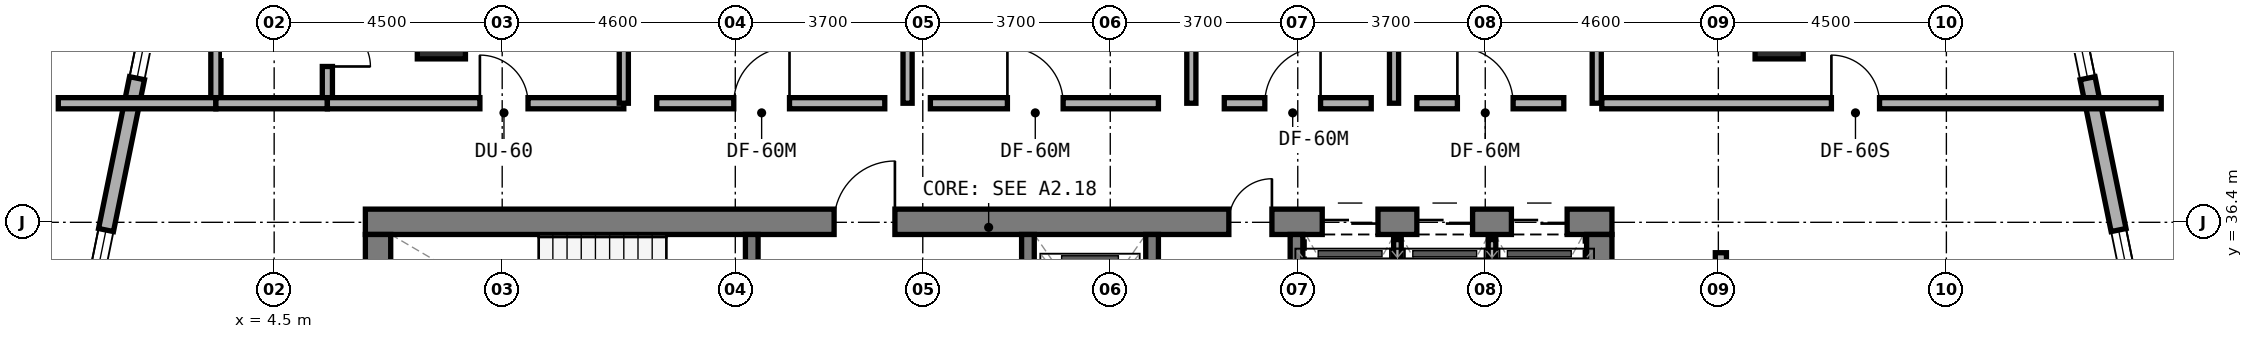
"""IFC4 building model, lengths in metres.
Left out: names, types, materials, properties, quantities, classifications, styles, units other than length and angle.
Written with IfcOpenShell. Run it as: python <this file> out.ifc"""

import sys

from ifc_helpers import new_model, si_unit, direction, frame, frame_2d, origin, origin_2d, place, context, subcontext, project, spatial, rectangle, extrude, element, fill, save


model = new_model("IFC4")
c1 = context("Model", 3, precision=1e-05, world=origin(), true_north=direction((0.0, 1.0)))
c2 = subcontext(c1, "Body", "Model", "MODEL_VIEW")
j1 = project(units=[si_unit("LENGTHUNIT", "METRE"), si_unit("PLANEANGLEUNIT", "RADIAN")], contexts=[c1])
p1 = place(None, origin())
s1 = spatial("IfcSite", under=j1, at=p1, CompositionType="ELEMENT")
p2 = place(p1, origin())
s2 = spatial("IfcBuilding", under=s1, at=p2, CompositionType="ELEMENT")
p3 = place(p2, frame((0.0, 0.0, 73.0)))
s3 = spatial("IfcBuildingStorey", under=s2, at=p3, CompositionType="ELEMENT", Elevation=73.0)
p4 = place(p3, frame((6.3, 36.41, 0.0), z_axis=(0.0, 0.0, 1.0), x_axis=(1.0, 0.0, 0.0)))
e1 = element("IfcWall", 1, at=p4, inside=s3, PredefinedType="SHEAR", context=c2, shape_type="SweptSolid", body=[
    extrude(rectangle(XDim=24.6, YDim=0.5, at=frame_2d((12.3, 0.0))), origin(), (0.0, 0.0, 1.0), 3.5),
])
p5 = place(p4, frame((9.25, 0.0, 0.0)))
e2 = element("IfcOpeningElement", 2, at=p5, cuts=e1, PredefinedType="OPENING", context=c2, shape_type="SweptSolid", body=[
    extrude(rectangle(XDim=1.2, YDim=2.15, at=frame_2d((0.6, 1.075))), frame((0.0, 0.26, 0.0), z_axis=(0.0, -1.0, 0.0), x_axis=(1.0, 0.0, 0.0)), (0.0, 0.0, 1.0), 0.52),
])
p6 = place(p4, frame((17.04, 0.0, 0.0)))
e3 = element("IfcOpeningElement", 3, at=p6, cuts=e1, PredefinedType="OPENING", context=c2, shape_type="SweptSolid", body=[
    extrude(rectangle(XDim=0.85, YDim=2.1, at=frame_2d((0.425, 1.05))), frame((0.0, 0.26, 0.0), z_axis=(0.0, -1.0, 0.0), x_axis=(1.0, 0.0, 0.0)), (0.0, 0.0, 1.0), 0.52),
])
p7 = place(p4, frame((18.883, 0.0, 0.0)))
e4 = element("IfcOpeningElement", 4, at=p7, cuts=e1, PredefinedType="OPENING", context=c2, shape_type="SweptSolid", body=[
    extrude(rectangle(XDim=1.1, YDim=2.15, at=frame_2d((0.55, 1.075))), frame((0.0, 0.26, 0.0), z_axis=(0.0, -1.0, 0.0), x_axis=(1.0, 0.0, 0.0)), (0.0, 0.0, 1.0), 0.52),
])
p8 = place(p4, frame((20.75, 0.0, 0.0)))
e5 = element("IfcOpeningElement", 5, at=p8, cuts=e1, PredefinedType="OPENING", context=c2, shape_type="SweptSolid", body=[
    extrude(rectangle(XDim=1.1, YDim=2.15, at=frame_2d((0.55, 1.075))), frame((0.0, 0.26, 0.0), z_axis=(0.0, -1.0, 0.0), x_axis=(1.0, 0.0, 0.0)), (0.0, 0.0, 1.0), 0.52),
])
p9 = place(p4, frame((22.616, 0.0, 0.0)))
e6 = element("IfcOpeningElement", 6, at=p9, cuts=e1, PredefinedType="OPENING", context=c2, shape_type="SweptSolid", body=[
    extrude(rectangle(XDim=1.1, YDim=2.15, at=frame_2d((0.55, 1.075))), frame((0.0, 0.26, 0.0), z_axis=(0.0, -1.0, 0.0), x_axis=(1.0, 0.0, 0.0)), (0.0, 0.0, 1.0), 0.52),
])
for number, where, z_axis, x_axis in (
    (7, (6.55, 33.0, 0.0), (0.0, 0.0, 1.0), (0.0, 1.0, 0.0)),
    (8, (30.65, 33.0, 0.0), (0.0, 0.0, 1.0), (0.0, 1.0, 0.0)),
):
    element("IfcWall", number, at=place(p3, frame(where, z_axis=z_axis, x_axis=x_axis)), inside=s3, PredefinedType="SHEAR", context=c2, shape_type="SweptSolid", body=[
        extrude(rectangle(XDim=3.16, YDim=0.5, at=frame_2d((1.58, 0.0))), origin(), (0.0, 0.0, 1.0), 3.5),
    ])
p10 = place(p3, frame((13.925, 33.0, 0.0), z_axis=(0.0, 0.0, 1.0), x_axis=(0.0, 1.0, 0.0)))
e9 = element("IfcWall", 9, at=p10, inside=s3, PredefinedType="STANDARD", context=c2, shape_type="SweptSolid", body=[
    extrude(rectangle(XDim=3.16, YDim=0.25, at=frame_2d((1.58, 0.0))), origin(), (0.0, 0.0, 1.0), 3.22),
])
p11 = place(p10, frame((0.98, 0.0, 0.0)))
e10 = element("IfcOpeningElement", 10, at=p11, cuts=e9, PredefinedType="OPENING", context=c2, shape_type="SweptSolid", body=[
    extrude(rectangle(XDim=1.1, YDim=2.15, at=frame_2d((0.55, 1.075))), frame((0.0, 0.135, 0.0), z_axis=(0.0, -1.0, 0.0), x_axis=(1.0, 0.0, 0.0)), (0.0, 0.0, 1.0), 0.27),
])
p12 = place(p3, frame((19.375, 33.0, 0.0), z_axis=(0.0, 0.0, 1.0), x_axis=(0.0, 1.0, 0.0)))
e11 = element("IfcWall", 11, at=p12, inside=s3, PredefinedType="STANDARD", context=c2, shape_type="SweptSolid", body=[
    extrude(rectangle(XDim=3.16, YDim=0.25, at=frame_2d((1.58, 0.0))), origin(), (0.0, 0.0, 1.0), 3.22),
])
p13 = place(p12, frame((0.98, 0.0, 0.0)))
e12 = element("IfcOpeningElement", 12, at=p13, cuts=e11, PredefinedType="OPENING", context=c2, shape_type="SweptSolid", body=[
    extrude(rectangle(XDim=1.1, YDim=2.15, at=frame_2d((0.55, 1.075))), frame((0.0, 0.135, 0.0), z_axis=(0.0, -1.0, 0.0), x_axis=(1.0, 0.0, 0.0)), (0.0, 0.0, 1.0), 0.27),
])
for number, where, z_axis, x_axis in (
    (13, (21.825, 33.0, 0.0), (0.0, 0.0, 1.0), (0.0, 1.0, 0.0)),
    (14, (24.675, 33.0, 0.0), (0.0, 0.0, 1.0), (0.0, 1.0, 0.0)),
):
    element("IfcWall", number, at=place(p3, frame(where, z_axis=z_axis, x_axis=x_axis)), inside=s3, PredefinedType="STANDARD", context=c2, shape_type="SweptSolid", body=[
        extrude(rectangle(XDim=3.16, YDim=0.25, at=frame_2d((1.58, 0.0))), origin(), (0.0, 0.0, 1.0), 3.22),
    ])
for number, where, z_axis, x_axis in (
    (15, (34.2, 40.2, 0.0), (0.0, 0.0, 1.0), (1.0, 0.0, 0.0)),
    (16, (7.8, 40.2, 0.0), (0.0, 0.0, 1.0), (1.0, 0.0, 0.0)),
):
    element("IfcColumn", number, at=place(p3, frame(where, z_axis=z_axis, x_axis=x_axis)), inside=s3, PredefinedType="COLUMN", context=c2, shape_type="SweptSolid", body=[
        extrude(rectangle(XDim=0.95, YDim=1.15, at=origin_2d()), origin(), (0.0, 0.0, 1.0), 3.5),
    ])
p14 = place(p3, frame((41.864, 31.516, 0.0), z_axis=(0.0, 0.0, 1.0), x_axis=(-0.199990901713, 0.979797754249, 0.0)))
e17 = element("IfcWall", 17, at=p14, inside=s3, PredefinedType="STANDARD", context=c2, shape_type="SweptSolid", body=[
    extrude(rectangle(XDim=10.065, YDim=0.3, at=frame_2d((5.033, 0.0))), origin(), (0.0, 0.0, 1.0), 3.22),
])
p15 = place(p14, frame((2.429, 0.0, 0.8)))
e18 = element("IfcOpeningElement", 18, at=p15, cuts=e17, PredefinedType="OPENING", context=c2, shape_type="SweptSolid", body=[
    extrude(rectangle(XDim=2.4, YDim=1.6, at=frame_2d((1.2, 0.8))), frame((0.0, 0.16, 0.0), z_axis=(0.0, -1.0, 0.0), x_axis=(1.0, 0.0, 0.0)), (0.0, 0.0, 1.0), 0.32),
])
p16 = place(p14, frame((7.887, 0.0, 0.85)))
e19 = element("IfcOpeningElement", 19, at=p16, cuts=e17, PredefinedType="OPENING", context=c2, shape_type="SweptSolid", body=[
    extrude(rectangle(XDim=1.8, YDim=1.5, at=frame_2d((0.9, 0.75))), frame((0.0, 0.16, 0.0), z_axis=(0.0, -1.0, 0.0), x_axis=(1.0, 0.0, 0.0)), (0.0, 0.0, 1.0), 0.32),
])
p17 = place(p3, frame((2.229, 41.378, 0.0), z_axis=(0.0, 0.0, 1.0), x_axis=(-0.199990901713, -0.979797754249, 0.0)))
e20 = element("IfcWall", 20, at=p17, inside=s3, PredefinedType="STANDARD", context=c2, shape_type="SweptSolid", body=[
    extrude(rectangle(XDim=10.065, YDim=0.3, at=frame_2d((5.033, 0.0))), origin(), (0.0, 0.0, 1.0), 3.22),
])
p18 = place(p17, frame((0.378, 0.0, 0.85)))
e21 = element("IfcOpeningElement", 21, at=p18, cuts=e20, PredefinedType="OPENING", context=c2, shape_type="SweptSolid", body=[
    extrude(rectangle(XDim=1.8, YDim=1.5, at=frame_2d((0.9, 0.75))), frame((0.0, 0.16, 0.0), z_axis=(0.0, -1.0, 0.0), x_axis=(1.0, 0.0, 0.0)), (0.0, 0.0, 1.0), 0.32),
])
p19 = place(p17, frame((5.236, 0.0, 0.8)))
e22 = element("IfcOpeningElement", 22, at=p19, cuts=e20, PredefinedType="OPENING", context=c2, shape_type="SweptSolid", body=[
    extrude(rectangle(XDim=2.4, YDim=1.6, at=frame_2d((1.2, 0.8))), frame((0.0, 0.16, 0.0), z_axis=(0.0, -1.0, 0.0), x_axis=(1.0, 0.0, 0.0)), (0.0, 0.0, 1.0), 0.32),
])
p20 = place(p3, frame((26.667, 33.1, 0.0), z_axis=(0.0, 0.0, 1.0), x_axis=(0.0, 1.0, 0.0)))
e23 = element("IfcWall", 23, at=p20, inside=s3, PredefinedType="PARTITIONING", context=c2, shape_type="SweptSolid", body=[
    extrude(rectangle(XDim=2.96, YDim=0.15, at=frame_2d((1.48, 0.0))), origin(), (0.0, 0.0, 1.0), 3.22),
])
p21 = place(p3, frame((28.533, 33.1, 0.0), z_axis=(0.0, 0.0, 1.0), x_axis=(0.0, 1.0, 0.0)))
e24 = element("IfcWall", 24, at=p21, inside=s3, PredefinedType="PARTITIONING", context=c2, shape_type="SweptSolid", body=[
    extrude(rectangle(XDim=2.96, YDim=0.15, at=frame_2d((1.48, 0.0))), origin(), (0.0, 0.0, 1.0), 2.495),
])
p22 = place(p3, frame((5.55, 38.85, 0.0), z_axis=(0.0, 0.0, 1.0), x_axis=(0.0, 1.0, 0.0)))
e25 = element("IfcWall", 25, at=p22, inside=s3, PredefinedType="PLUMBINGWALL", context=c2, shape_type="SweptSolid", body=[
    extrude(rectangle(XDim=2.1, YDim=0.2, at=frame_2d((1.05, 0.0))), origin(), (0.0, 0.0, 1.0), 3.22),
])
p23 = place(p22, frame((0.625, 0.0, 0.0)))
e26 = element("IfcOpeningElement", 26, at=p23, cuts=e25, PredefinedType="OPENING", context=c2, shape_type="SweptSolid", body=[
    extrude(rectangle(XDim=0.85, YDim=2.1, at=frame_2d((0.425, 1.05))), frame((0.0, 0.11, 0.0), z_axis=(0.0, -1.0, 0.0), x_axis=(1.0, 0.0, 0.0)), (0.0, 0.0, 1.0), 0.22),
])
p24 = place(p3, frame((3.35, 38.85, 0.0), z_axis=(0.0, 0.0, 1.0), x_axis=(0.0, 1.0, 0.0)))
e27 = element("IfcWall", 27, at=p24, inside=s3, PredefinedType="PLUMBINGWALL", context=c2, shape_type="SweptSolid", body=[
    extrude(rectangle(XDim=2.1, YDim=0.2, at=frame_2d((1.05, 0.0))), origin(), (0.0, 0.0, 1.0), 3.22),
])
p25 = place(p3, frame((0.24, 38.75, 0.0), z_axis=(0.0, 0.0, 1.0), x_axis=(1.0, 0.0, 0.0)))
e28 = element("IfcWall", 28, at=p25, inside=s3, PredefinedType="SOLIDWALL", context=c2, shape_type="SweptSolid", body=[
    extrude(rectangle(XDim=3.11, YDim=0.22, at=frame_2d((1.555, 0.0))), origin(), (0.0, 0.0, 1.0), 3.22),
])
p26 = place(p3, frame((3.35, 38.75, 0.0), z_axis=(0.0, 0.0, 1.0), x_axis=(1.0, 0.0, 0.0)))
e29 = element("IfcWall", 29, at=p26, inside=s3, PredefinedType="SOLIDWALL", context=c2, shape_type="SweptSolid", body=[
    extrude(rectangle(XDim=2.2, YDim=0.22, at=frame_2d((1.1, 0.0))), origin(), (0.0, 0.0, 1.0), 3.22),
])
p27 = place(p3, frame((5.55, 38.75, 0.0), z_axis=(0.0, 0.0, 1.0), x_axis=(1.0, 0.0, 0.0)))
e30 = element("IfcWall", 30, at=p27, inside=s3, PredefinedType="SOLIDWALL", context=c2, shape_type="SweptSolid", body=[
    extrude(rectangle(XDim=5.85, YDim=0.22, at=frame_2d((2.925, 0.0))), origin(), (0.0, 0.0, 1.0), 2.495),
])
p28 = place(p27, frame((3.01, 0.0, 0.0)))
e31 = element("IfcOpeningElement", 31, at=p28, cuts=e30, PredefinedType="OPENING", context=c2, shape_type="SweptSolid", body=[
    extrude(rectangle(XDim=0.95, YDim=2.1, at=frame_2d((0.475, 1.05))), frame((0.0, 0.12, 0.0), z_axis=(0.0, -1.0, 0.0), x_axis=(1.0, 0.0, 0.0)), (0.0, 0.0, 1.0), 0.24),
])
p29 = place(p3, frame((11.4, 38.75, 0.0), z_axis=(0.0, 0.0, 1.0), x_axis=(0.0, 1.0, 0.0)))
e32 = element("IfcWall", 32, at=p29, inside=s3, PredefinedType="SOLIDWALL", context=c2, shape_type="SweptSolid", body=[
    extrude(rectangle(XDim=7.45, YDim=0.18, at=frame_2d((3.725, 0.0))), origin(), (0.0, 0.0, 1.0), 2.745),
])
p30 = place(p3, frame((17.0, 38.75, 0.0), z_axis=(0.0, 0.0, 1.0), x_axis=(0.0, 1.0, 0.0)))
e33 = element("IfcWall", 33, at=p30, inside=s3, PredefinedType="SOLIDWALL", context=c2, shape_type="SweptSolid", body=[
    extrude(rectangle(XDim=8.19, YDim=0.18, at=frame_2d((4.095, 0.0))), origin(), (0.0, 0.0, 1.0), 2.745),
])
p31 = place(p3, frame((12.05, 38.75, 0.0), z_axis=(0.0, 0.0, 1.0), x_axis=(1.0, 0.0, 0.0)))
e34 = element("IfcWall", 34, at=p31, inside=s3, PredefinedType="SOLIDWALL", context=c2, shape_type="SweptSolid", body=[
    extrude(rectangle(XDim=4.5, YDim=0.22, at=frame_2d((2.25, 0.0))), origin(), (0.0, 0.0, 1.0), 2.495),
])
p32 = place(p31, frame((1.52, 0.0, 0.0)))
e35 = element("IfcOpeningElement", 35, at=p32, cuts=e34, PredefinedType="OPENING", context=c2, shape_type="SweptSolid", body=[
    extrude(rectangle(XDim=1.1, YDim=2.1, at=frame_2d((0.55, 1.05))), frame((0.0, 0.12, 0.0), z_axis=(0.0, -1.0, 0.0), x_axis=(1.0, 0.0, 0.0)), (0.0, 0.0, 1.0), 0.24),
])
p33 = place(p3, frame((17.45, 38.75, 0.0), z_axis=(0.0, 0.0, 1.0), x_axis=(1.0, 0.0, 0.0)))
e36 = element("IfcWall", 36, at=p33, inside=s3, PredefinedType="SOLIDWALL", context=c2, shape_type="SweptSolid", body=[
    extrude(rectangle(XDim=4.5, YDim=0.22, at=frame_2d((2.25, 0.0))), origin(), (0.0, 0.0, 1.0), 2.955),
])
p34 = place(p33, frame((1.52, 0.0, 0.0)))
e37 = element("IfcOpeningElement", 37, at=p34, cuts=e36, PredefinedType="OPENING", context=c2, shape_type="SweptSolid", body=[
    extrude(rectangle(XDim=1.1, YDim=2.1, at=frame_2d((0.55, 1.05))), frame((0.0, 0.12, 0.0), z_axis=(0.0, -1.0, 0.0), x_axis=(1.0, 0.0, 0.0)), (0.0, 0.0, 1.0), 0.24),
])
p35 = place(p3, frame((22.6, 38.75, 0.0), z_axis=(0.0, 0.0, 1.0), x_axis=(0.0, 1.0, 0.0)))
e38 = element("IfcWall", 38, at=p35, inside=s3, PredefinedType="SOLIDWALL", context=c2, shape_type="SweptSolid", body=[
    extrude(rectangle(XDim=8.19, YDim=0.18, at=frame_2d((4.095, 0.0))), origin(), (0.0, 0.0, 1.0), 2.745),
])
p36 = place(p3, frame((26.6, 38.75, 0.0), z_axis=(0.0, 0.0, 1.0), x_axis=(0.0, 1.0, 0.0)))
e39 = element("IfcWall", 39, at=p36, inside=s3, PredefinedType="SOLIDWALL", context=c2, shape_type="SweptSolid", body=[
    extrude(rectangle(XDim=8.19, YDim=0.18, at=frame_2d((4.095, 0.0))), origin(), (0.0, 0.0, 1.0), 2.495),
])
p37 = place(p3, frame((23.25, 38.75, 0.0), z_axis=(0.0, 0.0, 1.0), x_axis=(1.0, 0.0, 0.0)))
e40 = element("IfcWall", 40, at=p37, inside=s3, PredefinedType="SOLIDWALL", context=c2, shape_type="SweptSolid", body=[
    extrude(rectangle(XDim=2.9, YDim=0.22, at=frame_2d((1.45, 0.0))), origin(), (0.0, 0.0, 1.0), 2.495),
])
p38 = place(p37, frame((0.8, 0.0, 0.0)))
e41 = element("IfcOpeningElement", 41, at=p38, cuts=e40, PredefinedType="OPENING", context=c2, shape_type="SweptSolid", body=[
    extrude(rectangle(XDim=1.1, YDim=2.1, at=frame_2d((0.55, 1.05))), frame((0.0, 0.12, 0.0), z_axis=(0.0, -1.0, 0.0), x_axis=(1.0, 0.0, 0.0)), (0.0, 0.0, 1.0), 0.24),
])
p39 = place(p3, frame((27.05, 38.75, 0.0), z_axis=(0.0, 0.0, 1.0), x_axis=(1.0, 0.0, 0.0)))
e42 = element("IfcWall", 42, at=p39, inside=s3, PredefinedType="SOLIDWALL", context=c2, shape_type="SweptSolid", body=[
    extrude(rectangle(XDim=2.9, YDim=0.22, at=frame_2d((1.45, 0.0))), origin(), (0.0, 0.0, 1.0), 2.955),
])
p40 = place(p39, frame((0.8, 0.0, 0.0)))
e43 = element("IfcOpeningElement", 43, at=p40, cuts=e42, PredefinedType="OPENING", context=c2, shape_type="SweptSolid", body=[
    extrude(rectangle(XDim=1.1, YDim=2.1, at=frame_2d((0.55, 1.05))), frame((0.0, 0.12, 0.0), z_axis=(0.0, -1.0, 0.0), x_axis=(1.0, 0.0, 0.0)), (0.0, 0.0, 1.0), 0.24),
])
p41 = place(p3, frame((30.6, 38.75, 0.0), z_axis=(0.0, 0.0, 1.0), x_axis=(0.0, 1.0, 0.0)))
e44 = element("IfcWall", 44, at=p41, inside=s3, PredefinedType="SOLIDWALL", context=c2, shape_type="SweptSolid", body=[
    extrude(rectangle(XDim=7.467, YDim=0.18, at=frame_2d((3.733, 0.0))), origin(), (0.0, 0.0, 1.0), 2.745),
])
p42 = place(p3, frame((30.7, 38.75, 0.0), z_axis=(0.0, 0.0, 1.0), x_axis=(1.0, 0.0, 0.0)))
e45 = element("IfcWall", 45, at=p42, inside=s3, PredefinedType="SOLIDWALL", context=c2, shape_type="SweptSolid", body=[
    extrude(rectangle(XDim=11.04, YDim=0.22, at=frame_2d((5.52, 0.0))), origin(), (0.0, 0.0, 1.0), 2.495),
])
p43 = place(p42, frame((4.531, 0.0, 0.0)))
e46 = element("IfcOpeningElement", 46, at=p43, cuts=e45, PredefinedType="OPENING", context=c2, shape_type="SweptSolid", body=[
    extrude(rectangle(XDim=0.95, YDim=2.1, at=frame_2d((0.475, 1.05))), frame((0.0, 0.12, 0.0), z_axis=(0.0, -1.0, 0.0), x_axis=(1.0, 0.0, 0.0)), (0.0, 0.0, 1.0), 0.24),
])
p44 = place(p3, frame((33.05, 31.088, 0.0), z_axis=(0.0, 0.0, 1.0), x_axis=(0.0, 1.0, 0.0)))
e47 = element("IfcWall", 47, at=p44, inside=s3, PredefinedType="SOLIDWALL", context=c2, shape_type="SweptSolid", body=[
    extrude(rectangle(XDim=4.712, YDim=0.22, at=frame_2d((2.356, 0.0))), origin(), (0.0, 0.0, 1.0), 2.495),
])
p45 = place(p44, frame((1.881, 0.0, 0.0)))
e48 = element("IfcOpeningElement", 48, at=p45, cuts=e47, PredefinedType="OPENING", context=c2, shape_type="SweptSolid", body=[
    extrude(rectangle(XDim=0.95, YDim=2.1, at=frame_2d((0.475, 1.05))), frame((0.0, 0.12, 0.0), z_axis=(0.0, -1.0, 0.0), x_axis=(1.0, 0.0, 0.0)), (0.0, 0.0, 1.0), 0.24),
])
p46 = place(p15, origin())
e49 = element("IfcWindow", 49, at=p46, inside=s3, PartitioningType="SINGLE_PANEL", PredefinedType="WINDOW", context=c2, shape_type="SweptSolid", body=[
    extrude(rectangle(XDim=2.4, YDim=1.6, at=frame_2d((1.2, 0.8))), frame((0.0, 0.03, 0.0), z_axis=(0.0, -1.0, 0.0), x_axis=(1.0, 0.0, 0.0)), (0.0, 0.0, 1.0), 0.06),
])
fill(e18, e49)
p47 = place(p16, origin())
e50 = element("IfcWindow", 50, at=p47, inside=s3, PartitioningType="SINGLE_PANEL", PredefinedType="WINDOW", context=c2, shape_type="SweptSolid", body=[
    extrude(rectangle(XDim=1.8, YDim=1.5, at=frame_2d((0.9, 0.75))), frame((0.0, 0.03, 0.0), z_axis=(0.0, -1.0, 0.0), x_axis=(1.0, 0.0, 0.0)), (0.0, 0.0, 1.0), 0.06),
])
fill(e19, e50)
p48 = place(p18, origin())
e51 = element("IfcWindow", 51, at=p48, inside=s3, PartitioningType="SINGLE_PANEL", PredefinedType="WINDOW", context=c2, shape_type="SweptSolid", body=[
    extrude(rectangle(XDim=1.8, YDim=1.5, at=frame_2d((0.9, 0.75))), frame((0.0, 0.03, 0.0), z_axis=(0.0, -1.0, 0.0), x_axis=(1.0, 0.0, 0.0)), (0.0, 0.0, 1.0), 0.06),
])
fill(e21, e51)
p49 = place(p19, origin())
e52 = element("IfcWindow", 52, at=p49, inside=s3, PartitioningType="SINGLE_PANEL", PredefinedType="WINDOW", context=c2, shape_type="SweptSolid", body=[
    extrude(rectangle(XDim=2.4, YDim=1.6, at=frame_2d((1.2, 0.8))), frame((0.0, 0.03, 0.0), z_axis=(0.0, -1.0, 0.0), x_axis=(1.0, 0.0, 0.0)), (0.0, 0.0, 1.0), 0.06),
])
fill(e22, e52)
p50 = place(p5, origin())
e53 = element("IfcDoor", 53, at=p50, inside=s3, OperationType="SINGLE_SWING_RIGHT", PredefinedType="DOOR", context=c2, shape_type="SweptSolid", body=[
    extrude(rectangle(XDim=1.2, YDim=2.15, at=frame_2d((0.6, 1.075))), frame((0.0, 0.025, 0.0), z_axis=(0.0, -1.0, 0.0), x_axis=(1.0, 0.0, 0.0)), (0.0, 0.0, 1.0), 0.05),
])
fill(e2, e53)
p51 = place(p6, origin())
e54 = element("IfcDoor", 54, at=p51, inside=s3, OperationType="SINGLE_SWING_RIGHT", PredefinedType="DOOR", context=c2, shape_type="SweptSolid", body=[
    extrude(rectangle(XDim=0.85, YDim=2.1, at=frame_2d((0.425, 1.05))), frame((0.0, 0.025, 0.0), z_axis=(0.0, -1.0, 0.0), x_axis=(1.0, 0.0, 0.0)), (0.0, 0.0, 1.0), 0.05),
])
fill(e3, e54)
p52 = place(p7, origin())
e55 = element("IfcDoor", 55, at=p52, inside=s3, OperationType="DOUBLE_DOOR_SLIDING", PredefinedType="DOOR", context=c2, shape_type="SweptSolid", body=[
    extrude(rectangle(XDim=1.1, YDim=2.15, at=frame_2d((0.55, 1.075))), frame((0.0, 0.025, 0.0), z_axis=(0.0, -1.0, 0.0), x_axis=(1.0, 0.0, 0.0)), (0.0, 0.0, 1.0), 0.05),
])
fill(e4, e55)
p53 = place(p8, origin())
e56 = element("IfcDoor", 56, at=p53, inside=s3, OperationType="DOUBLE_DOOR_SLIDING", PredefinedType="DOOR", context=c2, shape_type="SweptSolid", body=[
    extrude(rectangle(XDim=1.1, YDim=2.15, at=frame_2d((0.55, 1.075))), frame((0.0, 0.025, 0.0), z_axis=(0.0, -1.0, 0.0), x_axis=(1.0, 0.0, 0.0)), (0.0, 0.0, 1.0), 0.05),
])
fill(e5, e56)
p54 = place(p9, origin())
e57 = element("IfcDoor", 57, at=p54, inside=s3, OperationType="DOUBLE_DOOR_SLIDING", PredefinedType="DOOR", context=c2, shape_type="SweptSolid", body=[
    extrude(rectangle(XDim=1.1, YDim=2.15, at=frame_2d((0.55, 1.075))), frame((0.0, 0.025, 0.0), z_axis=(0.0, -1.0, 0.0), x_axis=(1.0, 0.0, 0.0)), (0.0, 0.0, 1.0), 0.05),
])
fill(e6, e57)
p55 = place(p23, frame((0.85, 0.0, 0.0), z_axis=(0.0, 0.0, 1.0), x_axis=(-1.0, 0.0, 0.0)))
e58 = element("IfcDoor", 58, at=p55, inside=s3, OperationType="SINGLE_SWING_RIGHT", PredefinedType="DOOR", context=c2, shape_type="SweptSolid", body=[
    extrude(rectangle(XDim=0.85, YDim=2.1, at=frame_2d((0.425, 1.05))), frame((0.0, 0.025, 0.0), z_axis=(0.0, -1.0, 0.0), x_axis=(1.0, 0.0, 0.0)), (0.0, 0.0, 1.0), 0.05),
])
fill(e26, e58)
p56 = place(p28, origin())
e59 = element("IfcDoor", 59, at=p56, inside=s3, OperationType="SINGLE_SWING_LEFT", PredefinedType="DOOR", context=c2, shape_type="SweptSolid", body=[
    extrude(rectangle(XDim=0.95, YDim=2.1, at=frame_2d((0.475, 1.05))), frame((0.0, 0.025, 0.0), z_axis=(0.0, -1.0, 0.0), x_axis=(1.0, 0.0, 0.0)), (0.0, 0.0, 1.0), 0.05),
])
fill(e31, e59)
p57 = place(p32, origin())
e60 = element("IfcDoor", 60, at=p57, inside=s3, OperationType="SINGLE_SWING_RIGHT", PredefinedType="DOOR", context=c2, shape_type="SweptSolid", body=[
    extrude(rectangle(XDim=1.1, YDim=2.1, at=frame_2d((0.55, 1.05))), frame((0.0, 0.025, 0.0), z_axis=(0.0, -1.0, 0.0), x_axis=(1.0, 0.0, 0.0)), (0.0, 0.0, 1.0), 0.05),
])
fill(e35, e60)
p58 = place(p34, origin())
e61 = element("IfcDoor", 61, at=p58, inside=s3, OperationType="SINGLE_SWING_LEFT", PredefinedType="DOOR", context=c2, shape_type="SweptSolid", body=[
    extrude(rectangle(XDim=1.1, YDim=2.1, at=frame_2d((0.55, 1.05))), frame((0.0, 0.025, 0.0), z_axis=(0.0, -1.0, 0.0), x_axis=(1.0, 0.0, 0.0)), (0.0, 0.0, 1.0), 0.05),
])
fill(e37, e61)
p59 = place(p38, origin())
e62 = element("IfcDoor", 62, at=p59, inside=s3, OperationType="SINGLE_SWING_RIGHT", PredefinedType="DOOR", context=c2, shape_type="SweptSolid", body=[
    extrude(rectangle(XDim=1.1, YDim=2.1, at=frame_2d((0.55, 1.05))), frame((0.0, 0.025, 0.0), z_axis=(0.0, -1.0, 0.0), x_axis=(1.0, 0.0, 0.0)), (0.0, 0.0, 1.0), 0.05),
])
fill(e41, e62)
p60 = place(p40, origin())
e63 = element("IfcDoor", 63, at=p60, inside=s3, OperationType="SINGLE_SWING_LEFT", PredefinedType="DOOR", context=c2, shape_type="SweptSolid", body=[
    extrude(rectangle(XDim=1.1, YDim=2.1, at=frame_2d((0.55, 1.05))), frame((0.0, 0.025, 0.0), z_axis=(0.0, -1.0, 0.0), x_axis=(1.0, 0.0, 0.0)), (0.0, 0.0, 1.0), 0.05),
])
fill(e43, e63)
p61 = place(p43, origin())
e64 = element("IfcDoor", 64, at=p61, inside=s3, OperationType="SINGLE_SWING_LEFT", PredefinedType="DOOR", context=c2, shape_type="SweptSolid", body=[
    extrude(rectangle(XDim=0.95, YDim=2.1, at=frame_2d((0.475, 1.05))), frame((0.0, 0.025, 0.0), z_axis=(0.0, -1.0, 0.0), x_axis=(1.0, 0.0, 0.0)), (0.0, 0.0, 1.0), 0.05),
])
fill(e46, e64)
save(model, sys.argv[1])
